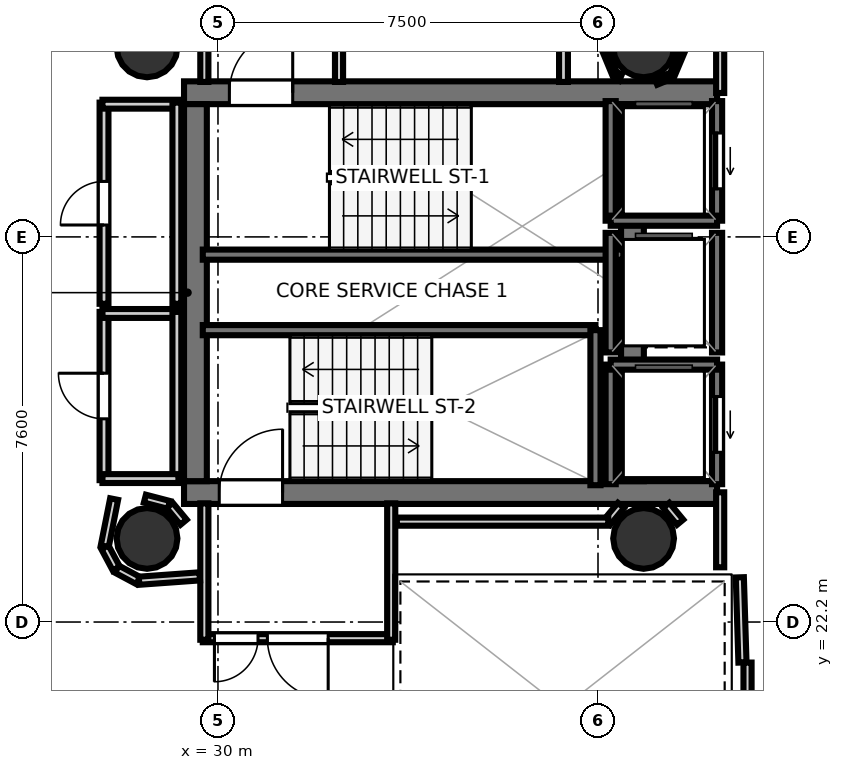
"""IFC4 building model, lengths in metres.
Left out: names, types, materials, properties, quantities, classifications, styles, units other than length and angle.
Written with IfcOpenShell. Run it as: python <this file> out.ifc"""

import sys

from ifc_helpers import new_model, si_unit, direction, frame, frame_2d, origin, origin_2d, place, context, subcontext, project, spatial, rectangle, hollow_circle, extrude, element, fill, save


model = new_model("IFC4")
c1 = context("Model", 3, precision=1e-05, world=origin(), true_north=direction((0.0, 1.0)))
c2 = subcontext(c1, "Body", "Model", "MODEL_VIEW")
j1 = project(units=[si_unit("LENGTHUNIT", "METRE"), si_unit("PLANEANGLEUNIT", "RADIAN")], contexts=[c1])
p1 = place(None, origin())
s1 = spatial("IfcSite", under=j1, at=p1, CompositionType="ELEMENT")
p2 = place(p1, origin())
s2 = spatial("IfcBuilding", under=s1, at=p2, CompositionType="ELEMENT")
p3 = place(p2, frame((0.0, 0.0, 218.8)))
s3 = spatial("IfcBuildingStorey", under=s2, at=p3, CompositionType="ELEMENT", Elevation=218.8)
p4 = place(p3, frame((29.33, 32.645, 0.0), z_axis=(0.0, 0.0, 1.0), x_axis=(1.0, 0.0, 0.0)))
e1 = element("IfcWall", 1, at=p4, inside=s3, PredefinedType="SHEAR", context=c2, shape_type="SweptSolid", body=[
    extrude(rectangle(XDim=10.52, YDim=0.45, at=frame_2d((5.26, 0.0))), origin(), (0.0, 0.0, 1.0), 3.52),
])
p5 = place(p4, frame((0.895, 0.0, 0.0)))
e2 = element("IfcOpeningElement", 2, at=p5, cuts=e1, PredefinedType="OPENING", context=c2, shape_type="SweptSolid", body=[
    extrude(rectangle(XDim=1.25, YDim=2.15, at=frame_2d((0.625, 1.075))), frame((0.0, 0.235, 0.0), z_axis=(0.0, -1.0, 0.0), x_axis=(1.0, 0.0, 0.0)), (0.0, 0.0, 1.0), 0.47),
])
p6 = place(p3, frame((29.33, 24.755, 0.0), z_axis=(0.0, 0.0, 1.0), x_axis=(1.0, 0.0, 0.0)))
e3 = element("IfcWall", 3, at=p6, inside=s3, PredefinedType="SHEAR", context=c2, shape_type="SweptSolid", body=[
    extrude(rectangle(XDim=10.52, YDim=0.45, at=frame_2d((5.26, 0.0))), origin(), (0.0, 0.0, 1.0), 3.52),
])
p7 = place(p6, frame((0.695, 0.0, 0.0)))
e4 = element("IfcOpeningElement", 4, at=p7, cuts=e3, PredefinedType="OPENING", context=c2, shape_type="SweptSolid", body=[
    extrude(rectangle(XDim=1.25, YDim=2.15, at=frame_2d((0.625, 1.075))), frame((0.0, 0.235, 0.0), z_axis=(0.0, -1.0, 0.0), x_axis=(1.0, 0.0, 0.0)), (0.0, 0.0, 1.0), 0.47),
])
for number, where, z_axis, x_axis in (
    (5, (29.555, 24.98, 0.0), (0.0, 0.0, 1.0), (0.0, 1.0, 0.0)),
    (6, (38.18, 24.98, 0.0), (0.0, 0.0, 1.0), (0.0, 1.0, 0.0)),
):
    element("IfcWall", number, at=place(p3, frame(where, z_axis=z_axis, x_axis=x_axis)), inside=s3, PredefinedType="SHEAR", context=c2, shape_type="SweptSolid", body=[
        extrude(rectangle(XDim=7.44, YDim=0.45, at=frame_2d((3.72, 0.0))), origin(), (0.0, 0.0, 1.0), 3.52),
    ])
for number, where, z_axis, x_axis in (
    (7, (28.6, 33.55, 0.0), (0.0, 0.0, 1.0), (1.0, 0.0, 0.0)),
    (8, (28.6, 23.85, 0.0), (0.0, 0.0, 1.0), (1.0, 0.0, 0.0)),
    (9, (38.4, 33.55, 0.0), (0.0, 0.0, 1.0), (1.0, 0.0, 0.0)),
    (10, (38.4, 23.85, 0.0), (0.0, 0.0, 1.0), (1.0, 0.0, 0.0)),
):
    element("IfcColumn", number, at=place(p3, frame(where, z_axis=z_axis, x_axis=x_axis)), inside=s3, PredefinedType="COLUMN", context=c2, shape_type="SweptSolid", body=[
        extrude(hollow_circle(Radius=0.6, WallThickness=0.03, at=origin_2d()), origin(), (0.0, 0.0, 1.0), 3.7),
    ])
p8 = place(p3, frame((29.7, 29.45, 0.0), z_axis=(0.0, 0.0, 1.0), x_axis=(1.0, 0.0, 0.0)))
e11 = element("IfcWall", 11, at=p8, inside=s3, PredefinedType="SOLIDWALL", context=c2, shape_type="SweptSolid", body=[
    extrude(rectangle(XDim=8.3, YDim=0.2, at=frame_2d((4.15, 0.0))), origin(), (0.0, 0.0, 1.0), 3.52),
])
p9 = place(p3, frame((29.7, 27.96, 0.0), z_axis=(0.0, 0.0, 1.0), x_axis=(1.0, 0.0, 0.0)))
e12 = element("IfcWall", 12, at=p9, inside=s3, PredefinedType="SOLIDWALL", context=c2, shape_type="SweptSolid", body=[
    extrude(rectangle(XDim=7.75, YDim=0.2, at=frame_2d((3.875, 0.0))), origin(), (0.0, 0.0, 1.0), 3.52),
])
p10 = place(p3, frame((37.45, 24.9, 0.0), z_axis=(0.0, 0.0, 1.0), x_axis=(0.0, 1.0, 0.0)))
e13 = element("IfcWall", 13, at=p10, inside=s3, PredefinedType="SOLIDWALL", context=c2, shape_type="SweptSolid", body=[
    extrude(rectangle(XDim=3.06, YDim=0.2, at=frame_2d((1.53, 0.0))), origin(), (0.0, 0.0, 1.0), 3.52),
])
p11 = place(p3, frame((39.85, 30.12, 0.0), z_axis=(0.0, 0.0, 1.0), x_axis=(0.0, 1.0, 0.0)))
e14 = element("IfcWall", 14, at=p11, inside=s3, PredefinedType="SOLIDWALL", context=c2, shape_type="SweptSolid", body=[
    extrude(rectangle(XDim=2.36, YDim=0.2, at=frame_2d((1.18, 0.0))), origin(), (0.0, 0.0, 1.0), 3.52),
])
p12 = place(p11, frame((0.63, 0.0, 0.0)))
e15 = element("IfcOpeningElement", 15, at=p12, cuts=e14, PredefinedType="OPENING", context=c2, shape_type="SweptSolid", body=[
    extrude(rectangle(XDim=1.1, YDim=2.15, at=frame_2d((0.55, 1.075))), frame((0.0, 0.11, 0.0), z_axis=(0.0, -1.0, 0.0), x_axis=(1.0, 0.0, 0.0)), (0.0, 0.0, 1.0), 0.22),
])
p13 = place(p3, frame((37.75, 30.12, 0.0), z_axis=(0.0, 0.0, 1.0), x_axis=(0.0, 1.0, 0.0)))
e16 = element("IfcWall", 16, at=p13, inside=s3, PredefinedType="SOLIDWALL", context=c2, shape_type="SweptSolid", body=[
    extrude(rectangle(XDim=2.36, YDim=0.2, at=frame_2d((1.18, 0.0))), origin(), (0.0, 0.0, 1.0), 3.52),
])
p14 = place(p3, frame((37.75, 30.12, 0.0), z_axis=(0.0, 0.0, 1.0), x_axis=(1.0, 0.0, 0.0)))
e17 = element("IfcWall", 17, at=p14, inside=s3, PredefinedType="SOLIDWALL", context=c2, shape_type="SweptSolid", body=[
    extrude(rectangle(XDim=2.1, YDim=0.2, at=frame_2d((1.05, 0.0))), origin(), (0.0, 0.0, 1.0), 3.52),
])
p15 = place(p3, frame((39.85, 24.92, 0.0), z_axis=(0.0, 0.0, 1.0), x_axis=(0.0, 1.0, 0.0)))
e18 = element("IfcWall", 18, at=p15, inside=s3, PredefinedType="SOLIDWALL", context=c2, shape_type="SweptSolid", body=[
    extrude(rectangle(XDim=2.36, YDim=0.2, at=frame_2d((1.18, 0.0))), origin(), (0.0, 0.0, 1.0), 3.52),
])
p16 = place(p15, frame((0.63, 0.0, 0.0)))
e19 = element("IfcOpeningElement", 19, at=p16, cuts=e18, PredefinedType="OPENING", context=c2, shape_type="SweptSolid", body=[
    extrude(rectangle(XDim=1.1, YDim=2.15, at=frame_2d((0.55, 1.075))), frame((0.0, 0.11, 0.0), z_axis=(0.0, -1.0, 0.0), x_axis=(1.0, 0.0, 0.0)), (0.0, 0.0, 1.0), 0.22),
])
p17 = place(p3, frame((37.75, 24.92, 0.0), z_axis=(0.0, 0.0, 1.0), x_axis=(0.0, 1.0, 0.0)))
e20 = element("IfcWall", 20, at=p17, inside=s3, PredefinedType="SOLIDWALL", context=c2, shape_type="SweptSolid", body=[
    extrude(rectangle(XDim=2.36, YDim=0.2, at=frame_2d((1.18, 0.0))), origin(), (0.0, 0.0, 1.0), 3.52),
])
p18 = place(p3, frame((37.75, 27.28, 0.0), z_axis=(0.0, 0.0, 1.0), x_axis=(1.0, 0.0, 0.0)))
e21 = element("IfcWall", 21, at=p18, inside=s3, PredefinedType="SOLIDWALL", context=c2, shape_type="SweptSolid", body=[
    extrude(rectangle(XDim=2.1, YDim=0.2, at=frame_2d((1.05, 0.0))), origin(), (0.0, 0.0, 1.0), 3.52),
])
for number, where, z_axis, x_axis in (
    (22, (39.85, 27.52, 0.0), (0.0, 0.0, 1.0), (0.0, 1.0, 0.0)),
    (23, (37.75, 27.52, 0.0), (0.0, 0.0, 1.0), (0.0, 1.0, 0.0)),
):
    element("IfcWall", number, at=place(p3, frame(where, z_axis=z_axis, x_axis=x_axis)), inside=s3, PredefinedType="SOLIDWALL", context=c2, shape_type="SweptSolid", body=[
        extrude(rectangle(XDim=2.36, YDim=0.2, at=frame_2d((1.18, 0.0))), origin(), (0.0, 0.0, 1.0), 3.52),
    ])
p19 = place(p3, frame((29.731, 32.858, 0.0), z_axis=(0.0, 0.0, 1.0), x_axis=(0.0, 1.0, 0.0)))
e24 = element("IfcWall", 24, at=p19, inside=s3, PredefinedType="PARTITIONING", context=c2, shape_type="SweptSolid", body=[
    extrude(rectangle(XDim=2.662, YDim=0.16, at=frame_2d((1.331, 0.0))), origin(), (0.0, 0.0, 1.0), 2.84),
])
p20 = place(p19, frame((1.478, 0.0, 0.0)))
e25 = element("IfcOpeningElement", 25, at=p20, cuts=e24, PredefinedType="OPENING", context=c2, shape_type="SweptSolid", body=[
    extrude(rectangle(XDim=0.86, YDim=2.05, at=frame_2d((0.43, 1.025))), frame((0.0, 0.09, 0.0), z_axis=(0.0, -1.0, 0.0), x_axis=(1.0, 0.0, 0.0)), (0.0, 0.0, 1.0), 0.18),
])
p21 = place(p3, frame((32.389, 35.52, 0.0), z_axis=(0.0, 0.0, 1.0), x_axis=(0.0, -1.0, 0.0)))
e26 = element("IfcWall", 26, at=p21, inside=s3, PredefinedType="PARTITIONING", context=c2, shape_type="SweptSolid", body=[
    extrude(rectangle(XDim=2.662, YDim=0.16, at=frame_2d((1.331, 0.0))), origin(), (0.0, 0.0, 1.0), 2.84),
])
p22 = place(p3, frame((33.45, 21.881, 0.0), z_axis=(0.0, 0.0, 1.0), x_axis=(-1.0, 0.0, 0.0)))
e27 = element("IfcWall", 27, at=p22, inside=s3, PredefinedType="PARTITIONING", context=c2, shape_type="SweptSolid", body=[
    extrude(rectangle(XDim=3.75, YDim=0.16, at=frame_2d((1.875, 0.0))), origin(), (0.0, 0.0, 1.0), 2.84),
])
p23 = place(p22, frame((1.275, 0.0, 0.0)))
e28 = element("IfcOpeningElement", 28, at=p23, cuts=e27, PredefinedType="OPENING", context=c2, shape_type="SweptSolid", body=[
    extrude(rectangle(XDim=1.2, YDim=2.15, at=frame_2d((0.6, 1.075))), frame((0.0, 0.09, 0.0), z_axis=(0.0, -1.0, 0.0), x_axis=(1.0, 0.0, 0.0)), (0.0, 0.0, 1.0), 0.18),
])
p24 = place(p22, frame((2.66, 0.0, 0.0)))
e29 = element("IfcOpeningElement", 29, at=p24, cuts=e27, PredefinedType="OPENING", context=c2, shape_type="SweptSolid", body=[
    extrude(rectangle(XDim=0.86, YDim=2.05, at=frame_2d((0.43, 1.025))), frame((0.0, 0.09, 0.0), z_axis=(0.0, -1.0, 0.0), x_axis=(1.0, 0.0, 0.0)), (0.0, 0.0, 1.0), 0.18),
])
for number, where, z_axis, x_axis in (
    (30, (29.731, 21.85, 0.0), (0.0, 0.0, 1.0), (0.0, 1.0, 0.0)),
    (31, (33.419, 24.542, 0.0), (0.0, 0.0, 1.0), (0.0, -1.0, 0.0)),
):
    element("IfcWall", number, at=place(p3, frame(where, z_axis=z_axis, x_axis=x_axis)), inside=s3, PredefinedType="PARTITIONING", context=c2, shape_type="SweptSolid", body=[
        extrude(rectangle(XDim=2.692, YDim=0.16, at=frame_2d((1.346, 0.0))), origin(), (0.0, 0.0, 1.0), 2.84),
    ])
p25 = place(p3, frame((40.351, 21.401, 0.0), z_axis=(0.0, 0.0, 1.0), x_axis=(-0.031058045979, 0.999517582527, 0.0)))
e32 = element("IfcWall", 32, at=p25, inside=s3, PredefinedType="PARTITIONING", context=c2, shape_type="SweptSolid", body=[
    extrude(rectangle(XDim=1.682, YDim=0.16, at=frame_2d((0.841, 0.0))), origin(), (0.0, 0.0, 1.0), 2.84),
])
p26 = place(p3, frame((39.911, 23.28, 0.0), z_axis=(0.0, 0.0, 1.0), x_axis=(0.0, 1.0, 0.0)))
e33 = element("IfcWall", 33, at=p26, inside=s3, PredefinedType="PARTITIONING", context=c2, shape_type="SweptSolid", body=[
    extrude(rectangle(XDim=1.48, YDim=0.16, at=frame_2d((0.74, 0.0))), origin(), (0.0, 0.0, 1.0), 2.84),
])
p27 = place(p3, frame((39.911, 32.64, 0.0), z_axis=(0.0, 0.0, 1.0), x_axis=(0.0, 1.0, 0.0)))
e34 = element("IfcWall", 34, at=p27, inside=s3, PredefinedType="PARTITIONING", context=c2, shape_type="SweptSolid", body=[
    extrude(rectangle(XDim=2.604, YDim=0.16, at=frame_2d((1.302, 0.0))), origin(), (0.0, 0.0, 1.0), 2.84),
])
p28 = place(p3, frame((40.451, 18.08, 0.0), z_axis=(0.0, 0.0, 1.0), x_axis=(0.0, 1.0, 0.0)))
e35 = element("IfcWall", 35, at=p28, inside=s3, PredefinedType="PARTITIONING", context=c2, shape_type="SweptSolid", body=[
    extrude(rectangle(XDim=3.32, YDim=0.16, at=frame_2d((1.66, 0.0))), origin(), (0.0, 0.0, 1.0), 2.84),
])
p29 = place(p3, frame((36.819, 35.48, 0.0), z_axis=(0.0, 0.0, 1.0), x_axis=(0.0, -1.0, 0.0)))
e36 = element("IfcWall", 36, at=p29, inside=s3, PredefinedType="PLUMBINGWALL", context=c2, shape_type="SweptSolid", body=[
    extrude(rectangle(XDim=2.622, YDim=0.175, at=frame_2d((1.311, 0.0))), origin(), (0.0, 0.0, 1.0), 2.84),
])
p30 = place(p3, frame((27.751, 25.0, 0.0), z_axis=(0.0, 0.0, 1.0), x_axis=(0.0, 1.0, 0.0)))
e37 = element("IfcWall", 37, at=p30, inside=s3, PredefinedType="PLUMBINGWALL", context=c2, shape_type="SweptSolid", body=[
    extrude(rectangle(XDim=3.32, YDim=0.175, at=frame_2d((1.66, 0.0))), origin(), (0.0, 0.0, 1.0), 2.84),
])
p31 = place(p30, frame((1.21, 0.0, 0.0)))
e38 = element("IfcOpeningElement", 38, at=p31, cuts=e37, PredefinedType="OPENING", context=c2, shape_type="SweptSolid", body=[
    extrude(rectangle(XDim=0.9, YDim=2.1, at=frame_2d((0.45, 1.05))), frame((0.0, 0.097, 0.0), z_axis=(0.0, -1.0, 0.0), x_axis=(1.0, 0.0, 0.0)), (0.0, 0.0, 1.0), 0.195),
])
p32 = place(p3, frame((27.72, 28.289, 0.0), z_axis=(0.0, 0.0, 1.0), x_axis=(1.0, 0.0, 0.0)))
e39 = element("IfcWall", 39, at=p32, inside=s3, PredefinedType="PLUMBINGWALL", context=c2, shape_type="SweptSolid", body=[
    extrude(rectangle(XDim=1.5, YDim=0.175, at=frame_2d((0.75, 0.0))), origin(), (0.0, 0.0, 1.0), 2.84),
])
p33 = place(p3, frame((29.189, 28.32, 0.0), z_axis=(0.0, 0.0, 1.0), x_axis=(0.0, -1.0, 0.0)))
e40 = element("IfcWall", 40, at=p33, inside=s3, PredefinedType="PLUMBINGWALL", context=c2, shape_type="SweptSolid", body=[
    extrude(rectangle(XDim=3.32, YDim=0.175, at=frame_2d((1.66, 0.0))), origin(), (0.0, 0.0, 1.0), 2.84),
])
p34 = place(p3, frame((29.22, 25.031, 0.0), z_axis=(0.0, 0.0, 1.0), x_axis=(-1.0, 0.0, 0.0)))
e41 = element("IfcWall", 41, at=p34, inside=s3, PredefinedType="PLUMBINGWALL", context=c2, shape_type="SweptSolid", body=[
    extrude(rectangle(XDim=1.5, YDim=0.175, at=frame_2d((0.75, 0.0))), origin(), (0.0, 0.0, 1.0), 2.84),
])
p35 = place(p3, frame((27.751, 28.48, 0.0), z_axis=(0.0, 0.0, 1.0), x_axis=(0.0, 1.0, 0.0)))
e42 = element("IfcWall", 42, at=p35, inside=s3, PredefinedType="PLUMBINGWALL", context=c2, shape_type="SweptSolid", body=[
    extrude(rectangle(XDim=3.97, YDim=0.175, at=frame_2d((1.985, 0.0))), origin(), (0.0, 0.0, 1.0), 2.84),
])
p36 = place(p35, frame((1.555, 0.0, 0.0)))
e43 = element("IfcOpeningElement", 43, at=p36, cuts=e42, PredefinedType="OPENING", context=c2, shape_type="SweptSolid", body=[
    extrude(rectangle(XDim=0.86, YDim=2.05, at=frame_2d((0.43, 1.025))), frame((0.0, 0.097, 0.0), z_axis=(0.0, -1.0, 0.0), x_axis=(1.0, 0.0, 0.0)), (0.0, 0.0, 1.0), 0.195),
])
p37 = place(p3, frame((27.72, 32.419, 0.0), z_axis=(0.0, 0.0, 1.0), x_axis=(1.0, 0.0, 0.0)))
e44 = element("IfcWall", 44, at=p37, inside=s3, PredefinedType="PLUMBINGWALL", context=c2, shape_type="SweptSolid", body=[
    extrude(rectangle(XDim=1.5, YDim=0.175, at=frame_2d((0.75, 0.0))), origin(), (0.0, 0.0, 1.0), 2.84),
])
p38 = place(p3, frame((29.189, 32.45, 0.0), z_axis=(0.0, 0.0, 1.0), x_axis=(0.0, -1.0, 0.0)))
e45 = element("IfcWall", 45, at=p38, inside=s3, PredefinedType="PLUMBINGWALL", context=c2, shape_type="SweptSolid", body=[
    extrude(rectangle(XDim=3.97, YDim=0.175, at=frame_2d((1.985, 0.0))), origin(), (0.0, 0.0, 1.0), 2.84),
])
p39 = place(p3, frame((29.321, 24.17, 0.0), z_axis=(0.0, 0.0, 1.0), x_axis=(-0.638008265708, 0.770029514296, 0.0)))
e46 = element("IfcWall", 46, at=p39, inside=s3, PredefinedType="PARTITIONING", context=c2, shape_type="SweptSolid", body=[
    extrude(rectangle(XDim=0.431, YDim=0.16, at=frame_2d((0.215, 0.0))), origin(), (0.0, 0.0, 1.0), 2.84),
])
p40 = place(p3, frame((29.03, 24.512, 0.0), z_axis=(0.0, 0.0, 1.0), x_axis=(-0.967681003213, 0.252177469296, 0.0)))
e47 = element("IfcWall", 47, at=p40, inside=s3, PredefinedType="PARTITIONING", context=c2, shape_type="SweptSolid", body=[
    extrude(rectangle(XDim=0.488, YDim=0.16, at=frame_2d((0.244, 0.0))), origin(), (0.0, 0.0, 1.0), 2.84),
])
for number, where, z_axis, x_axis in (
    (48, (39.121, 24.17, 0.0), (0.0, 0.0, 1.0), (-0.638, 0.77, 0.0)),
    (49, (37.954, 24.502, 0.0), (0.0, 0.0, 1.0), (-0.638, -0.77, 0.0)),
):
    element("IfcWall", number, at=place(p3, frame(where, z_axis=z_axis, x_axis=x_axis)), inside=s3, PredefinedType="PARTITIONING", context=c2, shape_type="SweptSolid", body=[
        extrude(rectangle(XDim=0.431, YDim=0.16, at=frame_2d((0.215, 0.0))), origin(), (0.0, 0.0, 1.0), 2.84),
    ])
p41 = place(p3, frame((37.703, 24.181, 0.0), z_axis=(0.0, 0.0, 1.0), x_axis=(-1.0, 0.0, 0.0)))
e50 = element("IfcWall", 50, at=p41, inside=s3, PredefinedType="PARTITIONING", context=c2, shape_type="SweptSolid", body=[
    extrude(rectangle(XDim=4.173, YDim=0.16, at=frame_2d((2.086, 0.0))), origin(), (0.0, 0.0, 1.0), 2.84),
])
p42 = place(p3, frame((27.95, 24.626, 0.0), z_axis=(0.0, 0.0, 1.0), x_axis=(-0.195125950178, -0.980778192848, 0.0)))
e51 = element("IfcWall", 51, at=p42, inside=s3, PredefinedType="PARTITIONING", context=c2, shape_type="SweptSolid", body=[
    extrude(rectangle(XDim=0.948, YDim=0.16, at=frame_2d((0.474, 0.0))), origin(), (0.0, 0.0, 1.0), 2.84),
])
for number, where, z_axis, x_axis in (
    (52, (27.768, 23.675, 0.0), (0.0, 0.0, 1.0), (0.472, -0.882, 0.0)),
    (53, (28.006, 23.243, 0.0), (0.0, 0.0, 1.0), (0.882, -0.472, 0.0)),
):
    element("IfcWall", number, at=place(p3, frame(where, z_axis=z_axis, x_axis=x_axis)), inside=s3, PredefinedType="PARTITIONING", context=c2, shape_type="SweptSolid", body=[
        extrude(rectangle(XDim=0.476, YDim=0.16, at=frame_2d((0.238, 0.0))), origin(), (0.0, 0.0, 1.0), 2.84),
    ])
p43 = place(p3, frame((28.442, 23.015, 0.0), z_axis=(0.0, 0.0, 1.0), x_axis=(0.99740683837, 0.07196942943, 0.0)))
e54 = element("IfcWall", 54, at=p43, inside=s3, PredefinedType="PARTITIONING", context=c2, shape_type="SweptSolid", body=[
    extrude(rectangle(XDim=1.201, YDim=0.16, at=frame_2d((0.601, 0.0))), origin(), (0.0, 0.0, 1.0), 2.84),
])
p44 = place(p3, frame((37.611, 33.538, 0.0), z_axis=(0.0, 0.0, 1.0), x_axis=(0.382796622927, -0.923832639322, 0.0)))
e55 = element("IfcWall", 55, at=p44, inside=s3, PredefinedType="PARTITIONING", context=c2, shape_type="SweptSolid", body=[
    extrude(rectangle(XDim=0.582, YDim=0.105, at=frame_2d((0.291, 0.0))), origin(), (0.0, 0.0, 1.0), 2.84),
])
p45 = place(p3, frame((37.851, 32.984, 0.0), z_axis=(0.0, 0.0, 1.0), x_axis=(0.924628481531, -0.380870281252, 0.0)))
e56 = element("IfcWall", 56, at=p45, inside=s3, PredefinedType="PARTITIONING", context=c2, shape_type="SweptSolid", body=[
    extrude(rectangle(XDim=0.102, YDim=0.14, at=frame_2d((0.051, 0.0))), origin(), (0.0, 0.0, 1.0), 2.84),
])
p46 = place(p3, frame((38.645, 32.858, 0.0), z_axis=(0.0, 0.0, 1.0), x_axis=(0.923908393326, 0.382613748761, 0.0)))
e57 = element("IfcWall", 57, at=p46, inside=s3, PredefinedType="PARTITIONING", context=c2, shape_type="SweptSolid", body=[
    extrude(rectangle(XDim=0.329, YDim=0.12, at=frame_2d((0.165, 0.0))), origin(), (0.0, 0.0, 1.0), 2.84),
])
p47 = place(p3, frame((38.966, 33.0, 0.0), z_axis=(0.0, 0.0, 1.0), x_axis=(0.389247517771, 0.921133198788, 0.0)))
e58 = element("IfcWall", 58, at=p47, inside=s3, PredefinedType="PARTITIONING", context=c2, shape_type="SweptSolid", body=[
    extrude(rectangle(XDim=0.568, YDim=0.105, at=frame_2d((0.284, 0.0))), origin(), (0.0, 0.0, 1.0), 2.84),
])
p48 = place(p5, origin())
e59 = element("IfcDoor", 59, at=p48, inside=s3, OperationType="SINGLE_SWING_RIGHT", PredefinedType="DOOR", context=c2, shape_type="SweptSolid", body=[
    extrude(rectangle(XDim=1.25, YDim=2.15, at=frame_2d((0.625, 1.075))), frame((0.0, 0.025, 0.0), z_axis=(0.0, -1.0, 0.0), x_axis=(1.0, 0.0, 0.0)), (0.0, 0.0, 1.0), 0.05),
])
fill(e2, e59)
p49 = place(p7, origin())
e60 = element("IfcDoor", 60, at=p49, inside=s3, OperationType="SINGLE_SWING_RIGHT", PredefinedType="DOOR", context=c2, shape_type="SweptSolid", body=[
    extrude(rectangle(XDim=1.25, YDim=2.15, at=frame_2d((0.625, 1.075))), frame((0.0, 0.025, 0.0), z_axis=(0.0, -1.0, 0.0), x_axis=(1.0, 0.0, 0.0)), (0.0, 0.0, 1.0), 0.05),
])
fill(e4, e60)
p50 = place(p12, origin())
e61 = element("IfcDoor", 61, at=p50, inside=s3, OperationType="SLIDING_TO_LEFT", PredefinedType="DOOR", context=c2, shape_type="SweptSolid", body=[
    extrude(rectangle(XDim=1.1, YDim=2.15, at=frame_2d((0.55, 1.075))), frame((0.0, 0.025, 0.0), z_axis=(0.0, -1.0, 0.0), x_axis=(1.0, 0.0, 0.0)), (0.0, 0.0, 1.0), 0.05),
])
fill(e15, e61)
p51 = place(p16, origin())
e62 = element("IfcDoor", 62, at=p51, inside=s3, OperationType="SLIDING_TO_LEFT", PredefinedType="DOOR", context=c2, shape_type="SweptSolid", body=[
    extrude(rectangle(XDim=1.1, YDim=2.15, at=frame_2d((0.55, 1.075))), frame((0.0, 0.025, 0.0), z_axis=(0.0, -1.0, 0.0), x_axis=(1.0, 0.0, 0.0)), (0.0, 0.0, 1.0), 0.05),
])
fill(e19, e62)
p52 = place(p23, origin())
e63 = element("IfcDoor", 63, at=p52, inside=s3, OperationType="SINGLE_SWING_LEFT", PredefinedType="DOOR", context=c2, shape_type="SweptSolid", body=[
    extrude(rectangle(XDim=1.2, YDim=2.15, at=frame_2d((0.6, 1.075))), frame((0.0, 0.025, 0.0), z_axis=(0.0, -1.0, 0.0), x_axis=(1.0, 0.0, 0.0)), (0.0, 0.0, 1.0), 0.05),
])
fill(e28, e63)
p53 = place(p31, origin())
e64 = element("IfcDoor", 64, at=p53, inside=s3, OperationType="SINGLE_SWING_RIGHT", PredefinedType="DOOR", context=c2, shape_type="SweptSolid", body=[
    extrude(rectangle(XDim=0.9, YDim=2.1, at=frame_2d((0.45, 1.05))), frame((0.0, 0.025, 0.0), z_axis=(0.0, -1.0, 0.0), x_axis=(1.0, 0.0, 0.0)), (0.0, 0.0, 1.0), 0.05),
])
fill(e38, e64)
p54 = place(p36, origin())
e65 = element("IfcDoor", 65, at=p54, inside=s3, OperationType="SINGLE_SWING_LEFT", PredefinedType="DOOR", context=c2, shape_type="SweptSolid", body=[
    extrude(rectangle(XDim=0.86, YDim=2.05, at=frame_2d((0.43, 1.025))), frame((0.0, 0.025, 0.0), z_axis=(0.0, -1.0, 0.0), x_axis=(1.0, 0.0, 0.0)), (0.0, 0.0, 1.0), 0.05),
])
fill(e43, e65)
p55 = place(p24, origin())
e66 = element("IfcDoor", 66, at=p55, inside=s3, OperationType="SINGLE_SWING_RIGHT", PredefinedType="DOOR", context=c2, shape_type="SweptSolid", body=[
    extrude(rectangle(XDim=0.86, YDim=2.05, at=frame_2d((0.43, 1.025))), frame((0.0, 0.025, 0.0), z_axis=(0.0, -1.0, 0.0), x_axis=(1.0, 0.0, 0.0)), (0.0, 0.0, 1.0), 0.05),
])
fill(e29, e66)
save(model, sys.argv[1])
